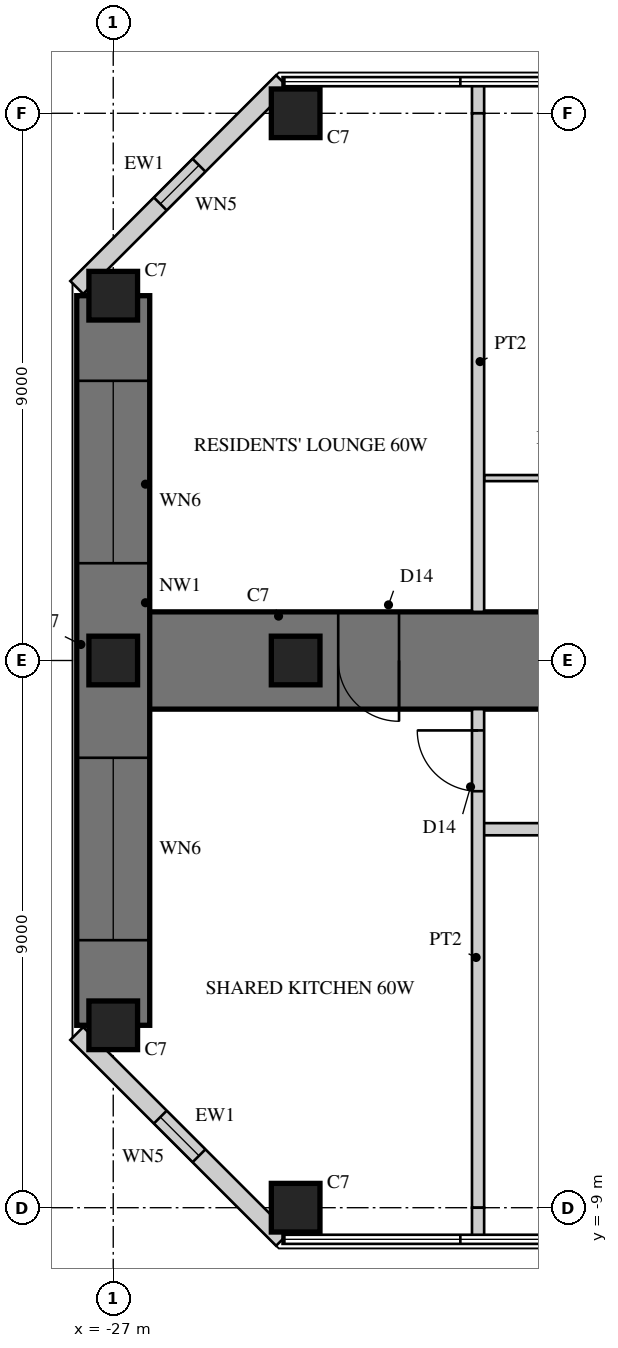
"""IFC4 building model, lengths in metres.
Left out: names, types, materials, properties, quantities, classifications, styles, units other than length and angle.
Written with IfcOpenShell. Run it as: python <this file> out.ifc"""

import sys

from ifc_helpers import new_model, si_unit, direction, frame, frame_2d, origin, origin_2d, place, context, subcontext, project, spatial, rectangle, hollow_rectangle, extrude, element, fill, save


model = new_model("IFC4")
c1 = context("Model", 3, precision=1e-05, world=origin(), true_north=direction((0.0, 1.0)))
c2 = subcontext(c1, "Body", "Model", "MODEL_VIEW")
j1 = project(units=[si_unit("LENGTHUNIT", "METRE"), si_unit("PLANEANGLEUNIT", "RADIAN")], contexts=[c1])
p1 = place(None, origin())
s1 = spatial("IfcSite", under=j1, at=p1, CompositionType="ELEMENT")
p2 = place(p1, origin())
s2 = spatial("IfcBuilding", under=s1, at=p2, CompositionType="ELEMENT")
p3 = place(p2, frame((0.0, 0.0, 235.7)))
s3 = spatial("IfcBuildingStorey", under=s2, at=p3, CompositionType="ELEMENT", Elevation=235.7)
p4 = place(p3, frame((-9.0, 0.0, 0.0), z_axis=(0.0, 0.0, 1.0), x_axis=(-1.0, 0.0, 0.0)))
e1 = element("IfcWall", 1, at=p4, inside=s3, PredefinedType="SHEAR", context=c2, shape_type="SweptSolid", body=[
    extrude(rectangle(XDim=18.0, YDim=1.6, at=frame_2d((9.0, 0.0))), origin(), (0.0, 0.0, 1.0), 3.4),
])
p5 = place(p4, frame((3.8, 0.0, 0.0)))
e2 = element("IfcOpeningElement", 2, at=p5, cuts=e1, PredefinedType="OPENING", context=c2, shape_type="SweptSolid", body=[
    extrude(rectangle(XDim=1.0, YDim=2.15, at=frame_2d((0.5, 1.075))), frame((0.0, 0.81, 0.0), z_axis=(0.0, -1.0, 0.0), x_axis=(1.0, 0.0, 0.0)), (0.0, 0.0, 1.0), 1.62),
])
p6 = place(p4, frame((6.6, 0.0, 0.0)))
e3 = element("IfcOpeningElement", 3, at=p6, cuts=e1, PredefinedType="OPENING", context=c2, shape_type="SweptSolid", body=[
    extrude(rectangle(XDim=1.0, YDim=2.15, at=frame_2d((0.5, 1.075))), frame((0.0, 0.81, 0.0), z_axis=(0.0, -1.0, 0.0), x_axis=(1.0, 0.0, 0.0)), (0.0, 0.0, 1.0), 1.62),
])
p7 = place(p4, frame((13.3, 0.0, 0.0)))
e4 = element("IfcOpeningElement", 4, at=p7, cuts=e1, PredefinedType="OPENING", context=c2, shape_type="SweptSolid", body=[
    extrude(rectangle(XDim=1.0, YDim=2.2, at=frame_2d((0.5, 1.1))), frame((0.0, 0.81, 0.0), z_axis=(0.0, -1.0, 0.0), x_axis=(1.0, 0.0, 0.0)), (0.0, 0.0, 1.0), 1.62),
])
p8 = place(p3, frame((-27.0, 6.0, 0.0), z_axis=(0.0, 0.0, 1.0), x_axis=(0.0, -1.0, 0.0)))
e5 = element("IfcWall", 5, at=p8, inside=s3, PredefinedType="SHEAR", context=c2, shape_type="SweptSolid", body=[
    extrude(rectangle(XDim=12.0, YDim=1.2, at=frame_2d((6.0, 0.0))), origin(), (0.0, 0.0, 1.0), 3.4),
])
p9 = place(p8, frame((1.4, 0.0, 0.6)))
e6 = element("IfcOpeningElement", 6, at=p9, cuts=e5, PredefinedType="OPENING", context=c2, shape_type="SweptSolid", body=[
    extrude(rectangle(XDim=3.0, YDim=2.4, at=frame_2d((1.5, 1.2))), frame((0.0, 0.61, 0.0), z_axis=(0.0, -1.0, 0.0), x_axis=(1.0, 0.0, 0.0)), (0.0, 0.0, 1.0), 1.22),
])
p10 = place(p8, frame((7.6, 0.0, 0.6)))
e7 = element("IfcOpeningElement", 7, at=p10, cuts=e5, PredefinedType="OPENING", context=c2, shape_type="SweptSolid", body=[
    extrude(rectangle(XDim=3.0, YDim=2.4, at=frame_2d((1.5, 1.2))), frame((0.0, 0.61, 0.0), z_axis=(0.0, -1.0, 0.0), x_axis=(1.0, 0.0, 0.0)), (0.0, 0.0, 1.0), 1.22),
])
for number, where, z_axis, x_axis in (
    (8, (-24.0, 9.0, 0.0), (0.0, 0.0, 1.0), (1.0, 0.0, 0.0)),
    (9, (-24.0, -9.0, 0.0), (0.0, 0.0, 1.0), (1.0, 0.0, 0.0)),
    (10, (-27.0, 6.0, 0.0), (0.0, 0.0, 1.0), (1.0, 0.0, 0.0)),
    (11, (-27.0, 0.0, 0.0), (0.0, 0.0, 1.0), (1.0, 0.0, 0.0)),
    (12, (-27.0, -6.0, 0.0), (0.0, 0.0, 1.0), (1.0, 0.0, 0.0)),
    (13, (-24.0, 0.0, 0.0), (0.0, 0.0, 1.0), (1.0, 0.0, 0.0)),
):
    element("IfcColumn", number, at=place(p3, frame(where, z_axis=z_axis, x_axis=x_axis)), inside=s3, PredefinedType="COLUMN", context=c2, shape_type="SweptSolid", body=[
        extrude(rectangle(XDim=0.8, YDim=0.8, at=origin_2d()), origin(), (0.0, 0.0, 1.0), 3.4),
    ])
p11 = place(p3, frame((-24.215, 9.52, 0.0), z_axis=(0.0, 0.0, 1.0), x_axis=(-0.707132283189, -0.707081278264, 0.0)))
e14 = element("IfcWall", 14, at=p11, inside=s3, PredefinedType="SOLIDWALL", context=c2, shape_type="SweptSolid", body=[
    extrude(rectangle(XDim=4.787, YDim=0.3, at=frame_2d((2.393, 0.0))), origin(), (0.0, 0.0, 1.0), 3.22),
])
p12 = place(p11, frame((1.943, 0.0, 0.3)))
e15 = element("IfcOpeningElement", 15, at=p12, cuts=e14, PredefinedType="OPENING", context=c2, shape_type="SweptSolid", body=[
    extrude(rectangle(XDim=0.9, YDim=2.4, at=frame_2d((0.45, 1.2))), frame((0.0, 0.16, 0.0), z_axis=(0.0, -1.0, 0.0), x_axis=(1.0, 0.0, 0.0)), (0.0, 0.0, 1.0), 0.32),
])
p13 = place(p3, frame((-27.6, -6.135, 0.0), z_axis=(0.0, 0.0, 1.0), x_axis=(0.707132283189, -0.707081278264, 0.0)))
e16 = element("IfcWall", 16, at=p13, inside=s3, PredefinedType="SOLIDWALL", context=c2, shape_type="SweptSolid", body=[
    extrude(rectangle(XDim=4.787, YDim=0.3, at=frame_2d((2.393, 0.0))), origin(), (0.0, 0.0, 1.0), 3.22),
])
p14 = place(p13, frame((1.943, 0.0, 0.3)))
e17 = element("IfcOpeningElement", 17, at=p14, cuts=e16, PredefinedType="OPENING", context=c2, shape_type="SweptSolid", body=[
    extrude(rectangle(XDim=0.9, YDim=2.4, at=frame_2d((0.45, 1.2))), frame((0.0, 0.16, 0.0), z_axis=(0.0, -1.0, 0.0), x_axis=(1.0, 0.0, 0.0)), (0.0, 0.0, 1.0), 0.32),
])
p15 = place(p3, frame((-18.4, 3.0, 0.0), z_axis=(0.0, 0.0, 1.0), x_axis=(-1.0, 0.0, 0.0)))
e18 = element("IfcWall", 18, at=p15, inside=s3, PredefinedType="PARTITIONING", context=c2, shape_type="SweptSolid", body=[
    extrude(rectangle(XDim=2.5, YDim=0.1, at=frame_2d((1.25, 0.0))), origin(), (0.0, 0.0, 1.0), 3.22),
])
p16 = place(p3, frame((-9.4, -2.775, 0.0), z_axis=(0.0, 0.0, 1.0), x_axis=(-1.0, 0.0, 0.0)))
e19 = element("IfcWall", 19, at=p16, inside=s3, PredefinedType="SOLIDWALL", context=c2, shape_type="SweptSolid", body=[
    extrude(rectangle(XDim=11.6, YDim=0.2, at=frame_2d((5.8, 0.0))), origin(), (0.0, 0.0, 1.0), 3.22),
])
p17 = place(p16, frame((3.4, 0.0, 0.0)))
e20 = element("IfcOpeningElement", 20, at=p17, cuts=e19, PredefinedType="OPENING", context=c2, shape_type="SweptSolid", body=[
    extrude(rectangle(XDim=1.0, YDim=2.15, at=frame_2d((0.5, 1.075))), frame((0.0, 0.11, 0.0), z_axis=(0.0, -1.0, 0.0), x_axis=(1.0, 0.0, 0.0)), (0.0, 0.0, 1.0), 0.22),
])
p18 = place(p3, frame((-21.0, 9.48, 0.0), z_axis=(0.0, 0.0, 1.0), x_axis=(0.0, -1.0, 0.0)))
e21 = element("IfcWall", 21, at=p18, inside=s3, PredefinedType="SOLIDWALL", context=c2, shape_type="SweptSolid", body=[
    extrude(rectangle(XDim=0.48, YDim=0.2, at=frame_2d((0.24, 0.0))), origin(), (0.0, 0.0, 1.0), 3.22),
])
p19 = place(p3, frame((-21.0, 9.0, 0.0), z_axis=(0.0, 0.0, 1.0), x_axis=(0.0, -1.0, 0.0)))
e22 = element("IfcWall", 22, at=p19, inside=s3, PredefinedType="SOLIDWALL", context=c2, shape_type="SweptSolid", body=[
    extrude(rectangle(XDim=8.2, YDim=0.2, at=frame_2d((4.1, 0.0))), origin(), (0.0, 0.0, 1.0), 2.67),
])
p20 = place(p3, frame((-21.0, -0.8, 0.0), z_axis=(0.0, 0.0, 1.0), x_axis=(0.0, -1.0, 0.0)))
e23 = element("IfcWall", 23, at=p20, inside=s3, PredefinedType="SOLIDWALL", context=c2, shape_type="SweptSolid", body=[
    extrude(rectangle(XDim=8.2, YDim=0.2, at=frame_2d((4.1, 0.0))), origin(), (0.0, 0.0, 1.0), 2.67),
])
p21 = place(p20, frame((0.35, 0.0, 0.0)))
e24 = element("IfcOpeningElement", 24, at=p21, cuts=e23, PredefinedType="OPENING", context=c2, shape_type="SweptSolid", body=[
    extrude(rectangle(XDim=1.0, YDim=2.2, at=frame_2d((0.5, 1.1))), frame((0.0, 0.11, 0.0), z_axis=(0.0, -1.0, 0.0), x_axis=(1.0, 0.0, 0.0)), (0.0, 0.0, 1.0), 0.22),
])
p22 = place(p3, frame((-21.0, -9.0, 0.0), z_axis=(0.0, 0.0, 1.0), x_axis=(0.0, -1.0, 0.0)))
e25 = element("IfcWall", 25, at=p22, inside=s3, PredefinedType="SOLIDWALL", context=c2, shape_type="SweptSolid", body=[
    extrude(rectangle(XDim=0.48, YDim=0.2, at=frame_2d((0.24, 0.0))), origin(), (0.0, 0.0, 1.0), 3.22),
])
p23 = place(p12, origin())
e26 = element("IfcWindow", 26, at=p23, inside=s3, PartitioningType="SINGLE_PANEL", PredefinedType="WINDOW", context=c2, shape_type="SweptSolid", body=[
    extrude(hollow_rectangle(XDim=0.9, YDim=2.4, WallThickness=0.06, at=frame_2d((0.45, 1.2))), frame((0.0, 0.03, 0.0), z_axis=(0.0, -1.0, 0.0), x_axis=(1.0, 0.0, 0.0)), (0.0, 0.0, 1.0), 0.06),
    extrude(rectangle(XDim=0.779, YDim=2.279, at=frame_2d((0.45, 1.2))), frame((0.0, 0.03, 0.0), z_axis=(0.0, -1.0, 0.0), x_axis=(1.0, 0.0, 0.0)), (0.0, 0.0, 1.0), 0.06),
])
fill(e15, e26)
p24 = place(p9, origin())
e27 = element("IfcWindow", 27, at=p24, inside=s3, PartitioningType="SINGLE_PANEL", PredefinedType="WINDOW", context=c2, shape_type="SweptSolid", body=[
    extrude(hollow_rectangle(XDim=3.0, YDim=2.4, WallThickness=0.06, at=frame_2d((1.5, 1.2))), frame((0.0, 0.03, 0.0), z_axis=(0.0, -1.0, 0.0), x_axis=(1.0, 0.0, 0.0)), (0.0, 0.0, 1.0), 0.06),
    extrude(rectangle(XDim=2.879, YDim=2.279, at=frame_2d((1.5, 1.2))), frame((0.0, 0.03, 0.0), z_axis=(0.0, -1.0, 0.0), x_axis=(1.0, 0.0, 0.0)), (0.0, 0.0, 1.0), 0.06),
])
fill(e6, e27)
p25 = place(p10, origin())
e28 = element("IfcWindow", 28, at=p25, inside=s3, PartitioningType="SINGLE_PANEL", PredefinedType="WINDOW", context=c2, shape_type="SweptSolid", body=[
    extrude(hollow_rectangle(XDim=3.0, YDim=2.4, WallThickness=0.06, at=frame_2d((1.5, 1.2))), frame((0.0, 0.03, 0.0), z_axis=(0.0, -1.0, 0.0), x_axis=(1.0, 0.0, 0.0)), (0.0, 0.0, 1.0), 0.06),
    extrude(rectangle(XDim=2.879, YDim=2.279, at=frame_2d((1.5, 1.2))), frame((0.0, 0.03, 0.0), z_axis=(0.0, -1.0, 0.0), x_axis=(1.0, 0.0, 0.0)), (0.0, 0.0, 1.0), 0.06),
])
fill(e7, e28)
p26 = place(p14, origin())
e29 = element("IfcWindow", 29, at=p26, inside=s3, PartitioningType="SINGLE_PANEL", PredefinedType="WINDOW", context=c2, shape_type="SweptSolid", body=[
    extrude(hollow_rectangle(XDim=0.9, YDim=2.4, WallThickness=0.06, at=frame_2d((0.45, 1.2))), frame((0.0, 0.03, 0.0), z_axis=(0.0, -1.0, 0.0), x_axis=(1.0, 0.0, 0.0)), (0.0, 0.0, 1.0), 0.06),
    extrude(rectangle(XDim=0.779, YDim=2.279, at=frame_2d((0.45, 1.2))), frame((0.0, 0.03, 0.0), z_axis=(0.0, -1.0, 0.0), x_axis=(1.0, 0.0, 0.0)), (0.0, 0.0, 1.0), 0.06),
])
fill(e17, e29)
p27 = place(p21, frame((1.0, 0.0, 0.0), z_axis=(0.0, 0.0, 1.0), x_axis=(-1.0, 0.0, 0.0)))
e30 = element("IfcDoor", 30, at=p27, inside=s3, OperationType="SINGLE_SWING_RIGHT", PredefinedType="DOOR", context=c2, shape_type="SweptSolid", body=[
    extrude(rectangle(XDim=1.0, YDim=2.2, at=frame_2d((0.5, 1.1))), frame((0.0, 0.025, 0.0), z_axis=(0.0, -1.0, 0.0), x_axis=(1.0, 0.0, 0.0)), (0.0, 0.0, 1.0), 0.05),
])
fill(e24, e30)
p28 = place(p7, origin())
e31 = element("IfcDoor", 31, at=p28, inside=s3, OperationType="SINGLE_SWING_LEFT", PredefinedType="DOOR", context=c2, shape_type="SweptSolid", body=[
    extrude(rectangle(XDim=1.0, YDim=2.2, at=frame_2d((0.5, 1.1))), frame((0.0, 0.025, 0.0), z_axis=(0.0, -1.0, 0.0), x_axis=(1.0, 0.0, 0.0)), (0.0, 0.0, 1.0), 0.05),
])
fill(e4, e31)
save(model, sys.argv[1])
